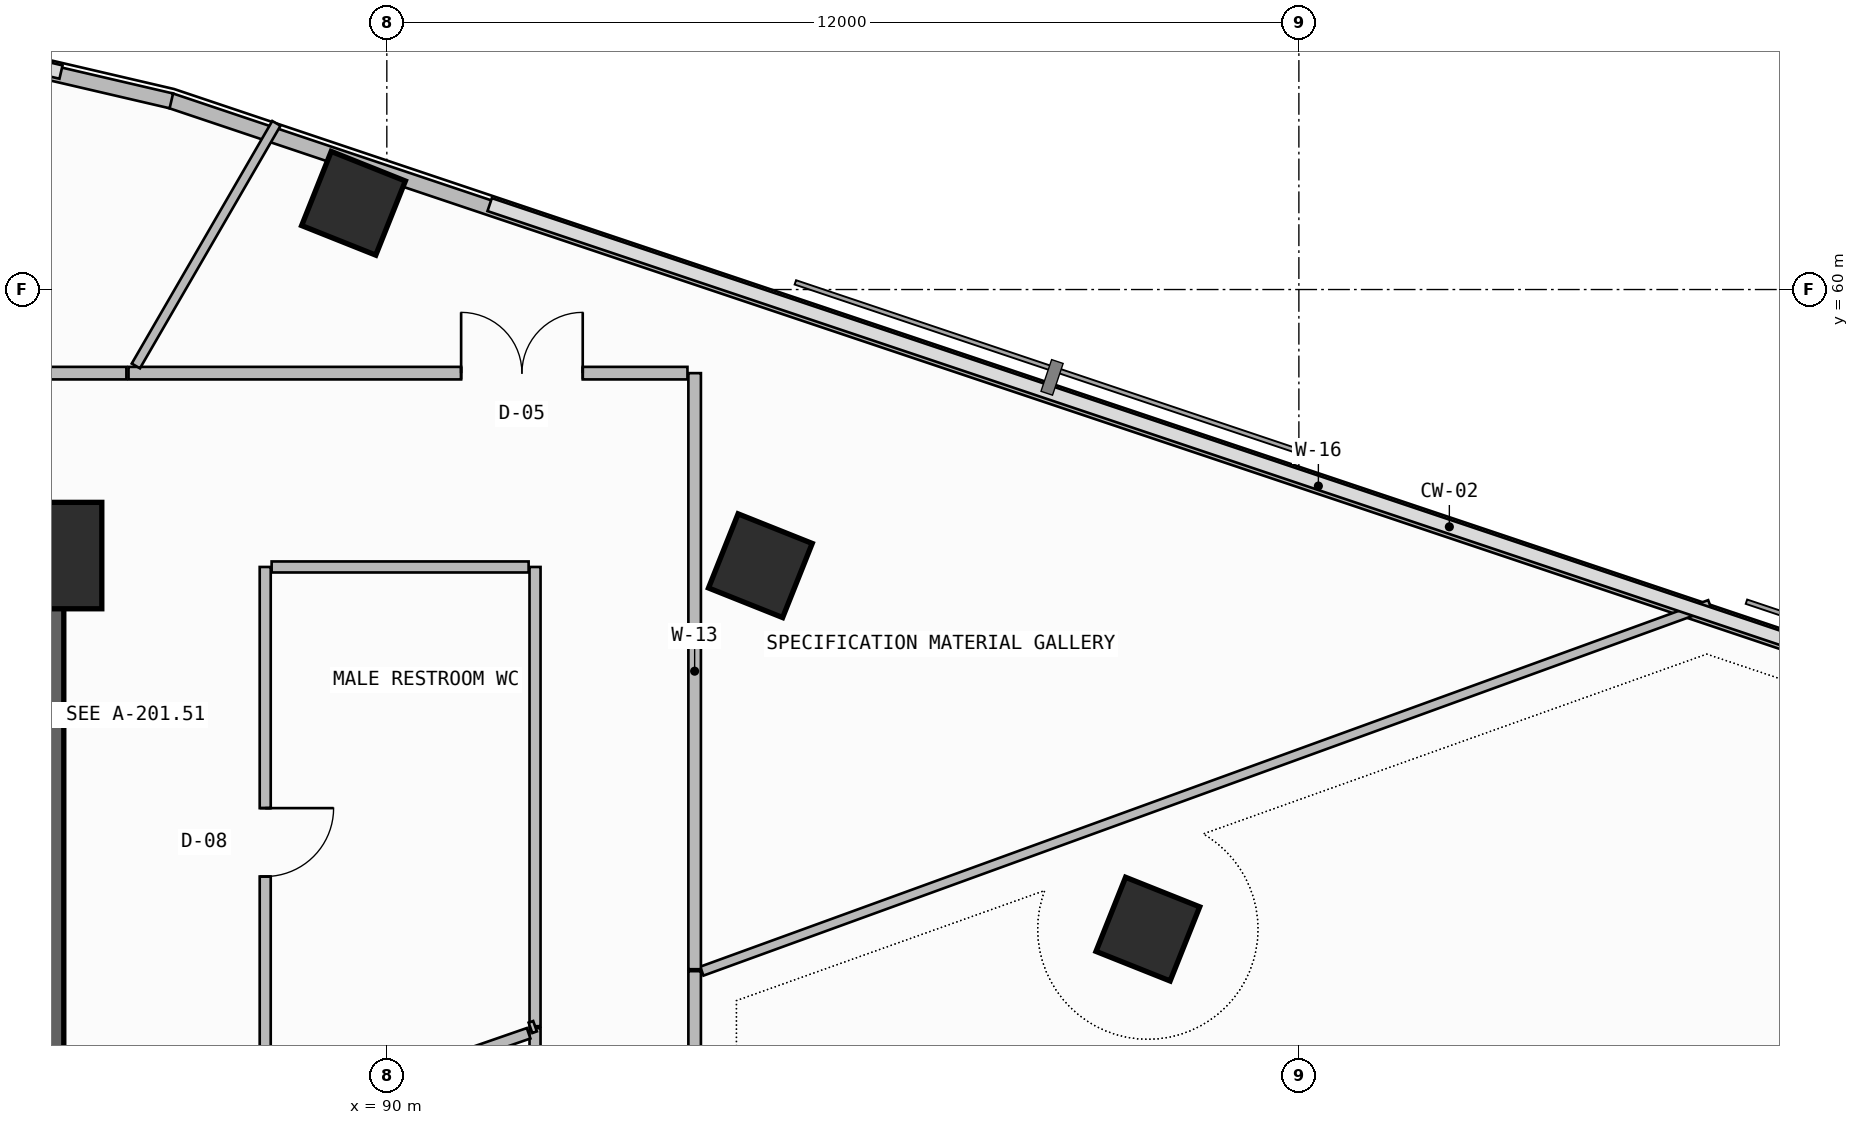
"""IFC4 building model, lengths in metres.
Left out: names, types, materials, properties, quantities, classifications, styles, units other than length and angle.
Written with IfcOpenShell. Run it as: python <this file> out.ifc"""

import sys

from ifc_helpers import new_model, si_unit, direction, frame, frame_2d, origin, origin_2d, place, context, subcontext, project, spatial, rectangle, extrude, element, fill, save


model = new_model("IFC4")
c1 = context("Model", 3, precision=1e-05, world=origin(), true_north=direction((0.0, 1.0)))
c2 = subcontext(c1, "Body", "Model", "MODEL_VIEW")
j1 = project(units=[si_unit("LENGTHUNIT", "METRE"), si_unit("PLANEANGLEUNIT", "RADIAN")], contexts=[c1])
p1 = place(None, origin())
s1 = spatial("IfcSite", under=j1, at=p1, CompositionType="ELEMENT")
p2 = place(p1, origin())
s2 = spatial("IfcBuilding", under=s1, at=p2, CompositionType="ELEMENT")
p3 = place(p2, frame((0.0, 0.0, 182.62)))
s3 = spatial("IfcBuildingStorey", under=s2, at=p3, CompositionType="ELEMENT", Elevation=182.62)
p4 = place(p3, frame((72.0, 56.425, -0.26), z_axis=(0.0, 0.0, 1.0), x_axis=(1.0, 0.0, 0.0)))
e1 = element("IfcWall", 1, at=p4, inside=s3, PredefinedType="SHEAR", context=c2, shape_type="SweptSolid", body=[
    extrude(rectangle(XDim=13.75, YDim=0.75, at=frame_2d((6.875, 0.0))), origin(), (0.0, 0.0, 1.0), 3.52),
])
p5 = place(p3, frame((85.375, 47.6, -0.26), z_axis=(0.0, 0.0, 1.0), x_axis=(0.0, 1.0, 0.0)))
e2 = element("IfcWall", 2, at=p5, inside=s3, PredefinedType="SHEAR", context=c2, shape_type="SweptSolid", body=[
    extrude(rectangle(XDim=8.45, YDim=0.75, at=frame_2d((4.225, 0.0))), origin(), (0.0, 0.0, 1.0), 3.52),
])
p6 = place(p3, frame((85.55, 56.5, 0.0), z_axis=(0.0, 0.0, 1.0), x_axis=(1.0, 0.0, 0.0)))
e3 = element("IfcColumn", 3, at=p6, inside=s3, PredefinedType="COLUMN", context=c2, shape_type="SweptSolid", body=[
    extrude(rectangle(XDim=1.4, YDim=1.4, at=origin_2d()), origin(), (0.0, 0.0, 1.0), 3.52),
])
for number, where, z_axis, x_axis in (
    (4, (100.013, 51.585, 0.0), (0.0, 0.0, 1.0), (0.371, 0.929, 0.0)),
    (5, (94.915, 56.367, 0.0), (0.0, 0.0, 1.0), (0.371, 0.929, 0.0)),
    (6, (89.562, 61.135, 0.0), (0.0, 0.0, 1.0), (0.371, 0.929, 0.0)),
):
    element("IfcColumn", number, at=place(p3, frame(where, z_axis=z_axis, x_axis=x_axis)), inside=s3, PredefinedType="COLUMN", context=c2, shape_type="SweptSolid", body=[
        extrude(rectangle(XDim=1.05, YDim=1.05, at=origin_2d()), origin(), (0.0, 0.0, 1.0), 3.52),
    ])
p7 = place(p3, frame((117.363, 52.344, 0.0), z_axis=(0.0, 0.0, 1.0), x_axis=(-0.94800468727, 0.31825636351, 0.0)))
e7 = element("IfcWall", 7, at=p7, inside=s3, PredefinedType="PARAPET", context=c2, shape_type="SweptSolid", body=[
    extrude(rectangle(XDim=31.869, YDim=0.2, at=frame_2d((15.935, 0.0))), origin(), (0.0, 0.0, 1.0), 1.15),
])
p8 = place(p3, frame((87.165, 62.482, 0.0), z_axis=(0.0, 0.0, 1.0), x_axis=(-0.973958631559, 0.226725790352, 0.0)))
e8 = element("IfcWall", 8, at=p8, inside=s3, PredefinedType="PARAPET", context=c2, shape_type="SweptSolid", body=[
    extrude(rectangle(XDim=27.376, YDim=0.2, at=frame_2d((13.688, 0.0))), origin(), (0.0, 0.0, 1.0), 1.15),
])
p9 = place(p3, frame((91.95, 50.283, 0.0), z_axis=(0.0, 0.0, 1.0), x_axis=(0.0, -1.0, 0.0)))
e9 = element("IfcWall", 9, at=p9, inside=s3, PredefinedType="PARTITIONING", context=c2, shape_type="SweptSolid", body=[
    extrude(rectangle(XDim=9.483, YDim=0.145, at=frame_2d((4.741, 0.0))), origin(), (0.0, 0.0, 1.0), 2.745),
])
p10 = place(p9, frame((4.292, 0.0, 0.0)))
e10 = element("IfcOpeningElement", 10, at=p10, cuts=e9, PredefinedType="OPENING", context=c2, shape_type="SweptSolid", body=[
    extrude(rectangle(XDim=0.9, YDim=2.1, at=frame_2d((0.45, 1.05))), frame((0.0, 0.083, 0.0), z_axis=(0.0, -1.0, 0.0), x_axis=(1.0, 0.0, 0.0)), (0.0, 0.0, 1.0), 0.165),
])
p11 = place(p3, frame((88.46, 49.036, 0.0), z_axis=(0.0, 0.0, 1.0), x_axis=(0.944947404907, 0.327222251627, 0.0)))
e11 = element("IfcWall", 11, at=p11, inside=s3, PredefinedType="PARTITIONING", context=c2, shape_type="SweptSolid", body=[
    extrude(rectangle(XDim=3.604, YDim=0.145, at=frame_2d((1.802, 0.0))), origin(), (0.0, 0.0, 1.0), 3.26),
])
p12 = place(p3, frame((94.05, 41.127, 0.0), z_axis=(0.0, 0.0, 1.0), x_axis=(0.0, 1.0, 0.0)))
e12 = element("IfcWall", 12, at=p12, inside=s3, PredefinedType="PARTITIONING", context=c2, shape_type="SweptSolid", body=[
    extrude(rectangle(XDim=9.906, YDim=0.165, at=frame_2d((4.953, 0.0))), origin(), (0.0, 0.0, 1.0), 2.745),
])
p13 = place(p12, frame((4.453, 0.0, 0.0)))
e13 = element("IfcOpeningElement", 13, at=p13, cuts=e12, PredefinedType="OPENING", context=c2, shape_type="SweptSolid", body=[
    extrude(rectangle(XDim=1.0, YDim=2.2, at=frame_2d((0.5, 1.1))), frame((0.0, 0.093, 0.0), z_axis=(0.0, -1.0, 0.0), x_axis=(1.0, 0.0, 0.0)), (0.0, 0.0, 1.0), 0.185),
])
p14 = place(p3, frame((94.145, 51.032, 0.0), z_axis=(0.0, 0.0, 1.0), x_axis=(0.939805041103, 0.341711112955, 0.0)))
e14 = element("IfcWall", 14, at=p14, inside=s3, PredefinedType="PARTITIONING", context=c2, shape_type="SweptSolid", body=[
    extrude(rectangle(XDim=14.111, YDim=0.125, at=frame_2d((7.056, 0.0))), origin(), (0.0, 0.0, 1.0), 2.645),
])
p15 = place(p3, frame((94.05, 51.058, 0.0), z_axis=(0.0, 0.0, 1.0), x_axis=(0.0, 1.0, 0.0)))
e15 = element("IfcWall", 15, at=p15, inside=s3, PredefinedType="PARTITIONING", context=c2, shape_type="SweptSolid", body=[
    extrude(rectangle(XDim=7.842, YDim=0.165, at=frame_2d((3.921, 0.0))), origin(), (0.0, 0.0, 1.0), 2.645),
])
p16 = place(p3, frame((93.956, 58.9, 0.0), z_axis=(0.0, 0.0, 1.0), x_axis=(-1.0, 0.0, 0.0)))
e16 = element("IfcWall", 16, at=p16, inside=s3, PredefinedType="PARTITIONING", context=c2, shape_type="SweptSolid", body=[
    extrude(rectangle(XDim=7.354, YDim=0.165, at=frame_2d((3.677, 0.0))), origin(), (0.0, 0.0, 1.0), 2.645),
])
p17 = place(p16, frame((1.378, 0.0, 0.0)))
e17 = element("IfcOpeningElement", 17, at=p17, cuts=e16, PredefinedType="OPENING", context=c2, shape_type="SweptSolid", body=[
    extrude(rectangle(XDim=1.6, YDim=2.3, at=frame_2d((0.8, 1.15))), frame((0.0, 0.093, 0.0), z_axis=(0.0, -1.0, 0.0), x_axis=(1.0, 0.0, 0.0)), (0.0, 0.0, 1.0), 0.185),
])
p18 = place(p3, frame((86.698, 58.994, 0.0), z_axis=(0.0, 0.0, 1.0), x_axis=(0.501304979079, 0.865270661672, 0.0)))
e18 = element("IfcWall", 18, at=p18, inside=s3, PredefinedType="PARTITIONING", context=c2, shape_type="SweptSolid", body=[
    extrude(rectangle(XDim=3.689, YDim=0.125, at=frame_2d((1.844, 0.0))), origin(), (0.0, 0.0, 1.0), 3.26),
])
p19 = place(p3, frame((88.4, 49.105, 0.0), z_axis=(0.0, 0.0, 1.0), x_axis=(0.0, 1.0, 0.0)))
e19 = element("IfcWall", 19, at=p19, inside=s3, PredefinedType="PARTITIONING", context=c2, shape_type="SweptSolid", body=[
    extrude(rectangle(XDim=7.245, YDim=0.145, at=frame_2d((3.623, 0.0))), origin(), (0.0, 0.0, 1.0), 2.745),
])
p20 = place(p19, frame((3.173, 0.0, 0.0)))
e20 = element("IfcOpeningElement", 20, at=p20, cuts=e19, PredefinedType="OPENING", context=c2, shape_type="SweptSolid", body=[
    extrude(rectangle(XDim=0.9, YDim=2.1, at=frame_2d((0.45, 1.05))), frame((0.0, 0.083, 0.0), z_axis=(0.0, -1.0, 0.0), x_axis=(1.0, 0.0, 0.0)), (0.0, 0.0, 1.0), 0.165),
])
p21 = place(p3, frame((91.95, 56.35, 0.0), z_axis=(0.0, 0.0, 1.0), x_axis=(0.0, -1.0, 0.0)))
e21 = element("IfcWall", 21, at=p21, inside=s3, PredefinedType="PARTITIONING", context=c2, shape_type="SweptSolid", body=[
    extrude(rectangle(XDim=6.042, YDim=0.145, at=frame_2d((3.021, 0.0))), origin(), (0.0, 0.0, 1.0), 2.745),
])
p22 = place(p3, frame((88.485, 56.35, 0.0), z_axis=(0.0, 0.0, 1.0), x_axis=(1.0, 0.0, 0.0)))
e22 = element("IfcWall", 22, at=p22, inside=s3, PredefinedType="PARTITIONING", context=c2, shape_type="SweptSolid", body=[
    extrude(rectangle(XDim=3.381, YDim=0.145, at=frame_2d((1.69, 0.0))), origin(), (0.0, 0.0, 1.0), 2.745),
])
p23 = place(p3, frame((91.95, 50.308, 0.0), z_axis=(0.0, 0.0, 1.0), x_axis=(-0.942777884126, -0.333421446825, 0.0)))
e23 = element("IfcWall", 23, at=p23, inside=s3, PredefinedType="PARTITIONING", context=c2, shape_type="SweptSolid", body=[
    extrude(rectangle(XDim=0.064, YDim=0.145, at=frame_2d((0.032, 0.0))), origin(), (0.0, 0.0, 1.0), 3.26),
])
p24 = place(p3, frame((86.573, 58.9, 0.0), z_axis=(0.0, 0.0, 1.0), x_axis=(-1.0, 0.0, 0.0)))
e24 = element("IfcWall", 24, at=p24, inside=s3, PredefinedType="PARTITIONING", context=c2, shape_type="SweptSolid", body=[
    extrude(rectangle(XDim=10.023, YDim=0.165, at=frame_2d((5.011, 0.0))), origin(), (0.0, 0.0, 1.0), 3.26),
])
p25 = place(p24, frame((4.511, 0.0, 0.0)))
e25 = element("IfcOpeningElement", 25, at=p25, cuts=e24, PredefinedType="OPENING", context=c2, shape_type="SweptSolid", body=[
    extrude(rectangle(XDim=1.0, YDim=2.2, at=frame_2d((0.5, 1.1))), frame((0.0, 0.093, 0.0), z_axis=(0.0, -1.0, 0.0), x_axis=(1.0, 0.0, 0.0)), (0.0, 0.0, 1.0), 0.185),
])
p26 = place(p17, frame((1.6, 0.0, 0.0), z_axis=(0.0, 0.0, 1.0), x_axis=(-1.0, 0.0, 0.0)))
e26 = element("IfcDoor", 26, at=p26, inside=s3, OperationType="DOUBLE_DOOR_SINGLE_SWING", PredefinedType="DOOR", context=c2, shape_type="SweptSolid", body=[
    extrude(rectangle(XDim=1.6, YDim=2.3, at=frame_2d((0.8, 1.15))), frame((0.0, 0.025, 0.0), z_axis=(0.0, -1.0, 0.0), x_axis=(1.0, 0.0, 0.0)), (0.0, 0.0, 1.0), 0.05),
])
fill(e17, e26)
p27 = place(p20, frame((0.9, 0.0, 0.0), z_axis=(0.0, 0.0, 1.0), x_axis=(-1.0, 0.0, 0.0)))
e27 = element("IfcDoor", 27, at=p27, inside=s3, OperationType="SINGLE_SWING_LEFT", PredefinedType="DOOR", context=c2, shape_type="SweptSolid", body=[
    extrude(rectangle(XDim=0.9, YDim=2.1, at=frame_2d((0.45, 1.05))), frame((0.0, 0.025, 0.0), z_axis=(0.0, -1.0, 0.0), x_axis=(1.0, 0.0, 0.0)), (0.0, 0.0, 1.0), 0.05),
])
fill(e20, e27)
save(model, sys.argv[1])
